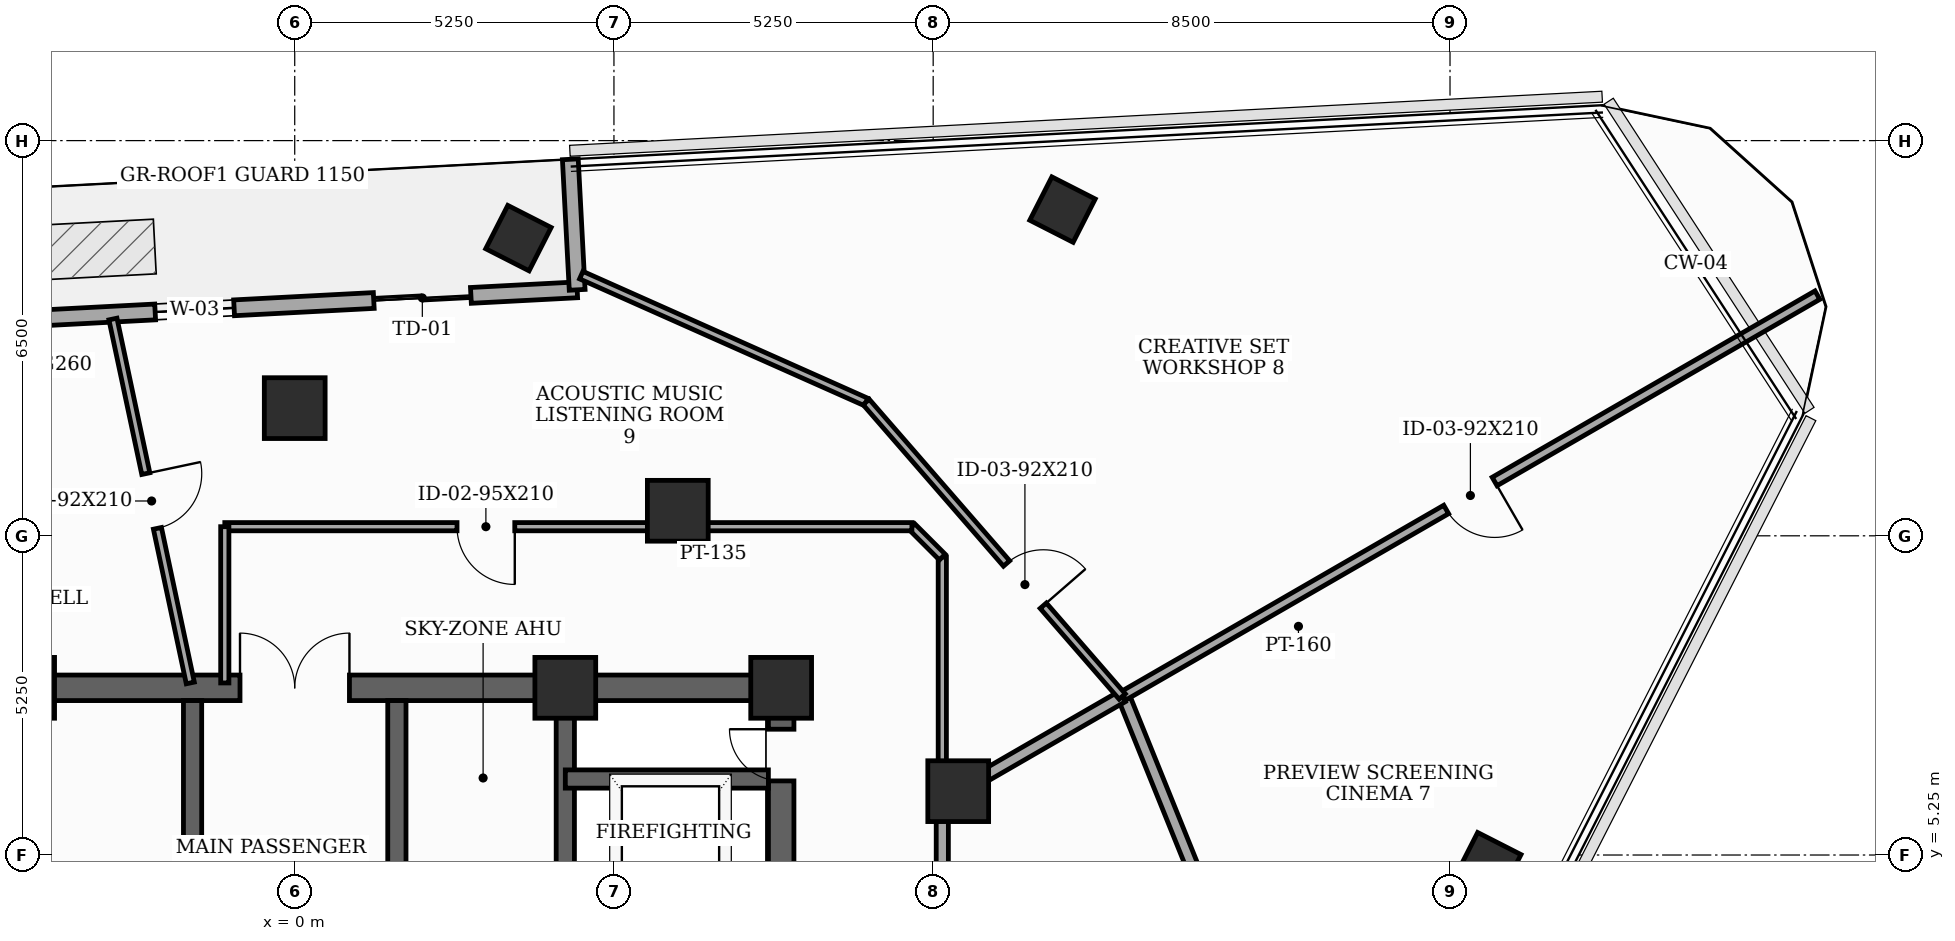
"""IFC4 building model, lengths in metres.
Left out: names, types, materials, properties, quantities, classifications, styles, units other than length and angle.
Written with IfcOpenShell. Run it as: python <this file> out.ifc"""

import sys

from ifc_helpers import new_model, si_unit, direction, frame, frame_2d, origin, origin_2d, place, context, subcontext, project, spatial, rectangle, extrude, element, fill, save


model = new_model("IFC4")
c1 = context("Model", 3, precision=1e-05, world=origin(), true_north=direction((0.0, 1.0)))
c2 = subcontext(c1, "Body", "Model", "MODEL_VIEW")
j1 = project(units=[si_unit("LENGTHUNIT", "METRE"), si_unit("PLANEANGLEUNIT", "RADIAN")], contexts=[c1])
p1 = place(None, origin())
s1 = spatial("IfcSite", under=j1, at=p1, CompositionType="ELEMENT")
p2 = place(p1, origin())
s2 = spatial("IfcBuilding", under=s1, at=p2, CompositionType="ELEMENT")
p3 = place(p2, frame((0.0, 0.0, 270.7)))
s3 = spatial("IfcBuildingStorey", under=s2, at=p3, CompositionType="ELEMENT", Elevation=270.7)
for number, where, z_axis, x_axis in (
    (1, (8.0, 8.0, 0.0), (0.0, 0.0, 1.0), (1.0, 0.0, 0.0)),
    (2, (4.45, 8.0, 0.0), (0.0, 0.0, 1.0), (1.0, 0.0, 0.0)),
    (3, (-4.45, 8.0, 0.0), (0.0, 0.0, 1.0), (1.0, 0.0, 0.0)),
    (4, (10.912, 6.3, 0.0), (0.0, 0.0, 1.0), (1.0, 0.0, 0.0)),
    (5, (6.3, 10.912, 0.0), (0.0, 0.0, 1.0), (1.0, 0.0, 0.0)),
    (6, (0.0, 12.6, 0.0), (0.0, 0.0, 1.0), (1.0, 0.0, 0.0)),
):
    element("IfcColumn", number, at=place(p3, frame(where, z_axis=z_axis, x_axis=x_axis)), inside=s3, PredefinedType="COLUMN", context=c2, shape_type="SweptSolid", body=[
        extrude(rectangle(XDim=1.0, YDim=1.0, at=origin_2d()), origin(), (0.0, 0.0, 1.0), 3.7),
    ])
for number, where, z_axis, x_axis in (
    (7, (19.629, 5.082, 0.0), (0.0, 0.0, 1.0), (0.454, 0.891, 0.0)),
    (8, (12.627, 15.865, 0.0), (0.0, 0.0, 1.0), (0.454, 0.891, 0.0)),
    (9, (3.679, 15.396, 0.0), (0.0, 0.0, 1.0), (0.454, 0.891, 0.0)),
):
    element("IfcColumn", number, at=place(p3, frame(where, z_axis=z_axis, x_axis=x_axis)), inside=s3, PredefinedType="COLUMN", context=c2, shape_type="SweptSolid", body=[
        extrude(rectangle(XDim=0.8, YDim=0.8, at=origin_2d()), origin(), (0.0, 0.0, 1.0), 3.7),
    ])
p4 = place(p3, frame((4.645, 14.546, 0.0), z_axis=(0.0, 0.0, 1.0), x_axis=(-0.99862973094, -0.052332212675, 0.0)))
e10 = element("IfcWall", 10, at=p4, inside=s3, PredefinedType="SOLIDWALL", context=c2, shape_type="SweptSolid", body=[
    extrude(rectangle(XDim=10.8, YDim=0.26, at=frame_2d((5.4, 0.0))), origin(), (0.0, 0.0, 1.0), 3.5),
])
p5 = place(p4, frame((1.75, 0.0, 0.0)))
e11 = element("IfcOpeningElement", 11, at=p5, cuts=e10, PredefinedType="OPENING", context=c2, shape_type="SweptSolid", body=[
    extrude(rectangle(XDim=1.6, YDim=2.08, at=frame_2d((0.8, 1.04))), frame((0.0, 0.14, 0.0), z_axis=(0.0, -1.0, 0.0), x_axis=(1.0, 0.0, 0.0)), (0.0, 0.0, 1.0), 0.28),
])
p6 = place(p4, frame((5.65, 0.0, 0.85)))
e12 = element("IfcOpeningElement", 12, at=p6, cuts=e10, PredefinedType="OPENING", context=c2, shape_type="SweptSolid", body=[
    extrude(rectangle(XDim=1.3, YDim=1.25, at=frame_2d((0.65, 0.625))), frame((0.0, 0.14, 0.0), z_axis=(0.0, -1.0, 0.0), x_axis=(1.0, 0.0, 0.0)), (0.0, 0.0, 1.0), 0.28),
])
p7 = place(p3, frame((4.532, 16.693, 0.0), z_axis=(0.0, 0.0, 1.0), x_axis=(0.052350224103, -0.998628786905, 0.0)))
e13 = element("IfcWall", 13, at=p7, inside=s3, PredefinedType="SOLIDWALL", context=c2, shape_type="SweptSolid", body=[
    extrude(rectangle(XDim=2.15, YDim=0.26, at=frame_2d((1.075, 0.0))), origin(), (0.0, 0.0, 1.0), 3.5),
])
p8 = place(p3, frame((8.0, -8.0, 0.0), z_axis=(0.0, 0.0, 1.0), x_axis=(0.0, 1.0, 0.0)))
e14 = element("IfcWall", 14, at=p8, inside=s3, PredefinedType="SHEAR", context=c2, shape_type="SweptSolid", body=[
    extrude(rectangle(XDim=16.0, YDim=0.42, at=frame_2d((8.0, 0.0))), origin(), (0.0, 0.0, 1.0), 3.5),
])
p9 = place(p8, frame((9.6, 0.0, 0.0)))
e15 = element("IfcOpeningElement", 15, at=p9, cuts=e14, PredefinedType="OPENING", context=c2, shape_type="SweptSolid", body=[
    extrude(rectangle(XDim=1.05, YDim=2.15, at=frame_2d((0.525, 1.075))), frame((0.0, 0.22, 0.0), z_axis=(0.0, -1.0, 0.0), x_axis=(1.0, 0.0, 0.0)), (0.0, 0.0, 1.0), 0.44),
])
p10 = place(p8, frame((14.469, 0.0, 0.0)))
e16 = element("IfcOpeningElement", 16, at=p10, cuts=e14, PredefinedType="OPENING", context=c2, shape_type="SweptSolid", body=[
    extrude(rectangle(XDim=0.85, YDim=2.02, at=frame_2d((0.425, 1.01))), frame((0.0, 0.22, 0.0), z_axis=(0.0, -1.0, 0.0), x_axis=(1.0, 0.0, 0.0)), (0.0, 0.0, 1.0), 0.44),
])
p11 = place(p3, frame((-8.0, 8.0, 0.0), z_axis=(0.0, 0.0, 1.0), x_axis=(1.0, 0.0, 0.0)))
e17 = element("IfcWall", 17, at=p11, inside=s3, PredefinedType="SHEAR", context=c2, shape_type="SweptSolid", body=[
    extrude(rectangle(XDim=16.0, YDim=0.42, at=frame_2d((8.0, 0.0))), origin(), (0.0, 0.0, 1.0), 3.5),
])
p12 = place(p11, frame((7.1, 0.0, 0.0)))
e18 = element("IfcOpeningElement", 18, at=p12, cuts=e17, PredefinedType="OPENING", context=c2, shape_type="SweptSolid", body=[
    extrude(rectangle(XDim=1.8, YDim=2.15, at=frame_2d((0.9, 1.075))), frame((0.0, 0.22, 0.0), z_axis=(0.0, -1.0, 0.0), x_axis=(1.0, 0.0, 0.0)), (0.0, 0.0, 1.0), 0.44),
])
p13 = place(p3, frame((4.45, -7.79, 0.0), z_axis=(0.0, 0.0, 1.0), x_axis=(0.0, 1.0, 0.0)))
e19 = element("IfcWall", 19, at=p13, inside=s3, PredefinedType="SHEAR", context=c2, shape_type="SweptSolid", body=[
    extrude(rectangle(XDim=15.58, YDim=0.3, at=frame_2d((7.79, 0.0))), origin(), (0.0, 0.0, 1.0), 3.5),
])
p14 = place(p3, frame((4.45, 6.5, 0.0), z_axis=(0.0, 0.0, 1.0), x_axis=(1.0, 0.0, 0.0)))
e20 = element("IfcWall", 20, at=p14, inside=s3, PredefinedType="SHEAR", context=c2, shape_type="SweptSolid", body=[
    extrude(rectangle(XDim=3.34, YDim=0.3, at=frame_2d((1.67, 0.0))), origin(), (0.0, 0.0, 1.0), 3.5),
])
p15 = place(p3, frame((-1.68, -4.85, 0.0), z_axis=(0.0, 0.0, 1.0), x_axis=(0.0, 1.0, 0.0)))
e21 = element("IfcWall", 21, at=p15, inside=s3, PredefinedType="SHEAR", context=c2, shape_type="SweptSolid", body=[
    extrude(rectangle(XDim=12.64, YDim=0.3, at=frame_2d((6.32, 0.0))), origin(), (0.0, 0.0, 1.0), 3.5),
])
p16 = place(p15, frame((1.05, 0.0, 0.0)))
e22 = element("IfcOpeningElement", 22, at=p16, cuts=e21, PredefinedType="OPENING", context=c2, shape_type="SweptSolid", body=[
    extrude(rectangle(XDim=0.85, YDim=2.02, at=frame_2d((0.425, 1.01))), frame((0.0, 0.16, 0.0), z_axis=(0.0, -1.0, 0.0), x_axis=(1.0, 0.0, 0.0)), (0.0, 0.0, 1.0), 0.32),
])
p17 = place(p15, frame((6.8, 0.0, 0.0)))
e23 = element("IfcOpeningElement", 23, at=p17, cuts=e21, PredefinedType="OPENING", context=c2, shape_type="SweptSolid", body=[
    extrude(rectangle(XDim=0.95, YDim=2.1, at=frame_2d((0.475, 1.05))), frame((0.0, 0.16, 0.0), z_axis=(0.0, -1.0, 0.0), x_axis=(1.0, 0.0, 0.0)), (0.0, 0.0, 1.0), 0.32),
])
p18 = place(p3, frame((1.68, -4.85, 0.0), z_axis=(0.0, 0.0, 1.0), x_axis=(0.0, 1.0, 0.0)))
e24 = element("IfcWall", 24, at=p18, inside=s3, PredefinedType="SHEAR", context=c2, shape_type="SweptSolid", body=[
    extrude(rectangle(XDim=12.64, YDim=0.3, at=frame_2d((6.32, 0.0))), origin(), (0.0, 0.0, 1.0), 3.5),
])
p19 = place(p18, frame((0.55, 0.0, 0.0)))
e25 = element("IfcOpeningElement", 25, at=p19, cuts=e24, PredefinedType="OPENING", context=c2, shape_type="SweptSolid", body=[
    extrude(rectangle(XDim=1.1, YDim=2.1, at=frame_2d((0.55, 1.05))), frame((0.0, 0.16, 0.0), z_axis=(0.0, -1.0, 0.0), x_axis=(1.0, 0.0, 0.0)), (0.0, 0.0, 1.0), 0.32),
])
p20 = place(p18, frame((2.65, 0.0, 0.0)))
e26 = element("IfcOpeningElement", 26, at=p20, cuts=e24, PredefinedType="OPENING", context=c2, shape_type="SweptSolid", body=[
    extrude(rectangle(XDim=1.1, YDim=2.1, at=frame_2d((0.55, 1.05))), frame((0.0, 0.16, 0.0), z_axis=(0.0, -1.0, 0.0), x_axis=(1.0, 0.0, 0.0)), (0.0, 0.0, 1.0), 0.32),
])
p21 = place(p18, frame((4.75, 0.0, 0.0)))
e27 = element("IfcOpeningElement", 27, at=p21, cuts=e24, PredefinedType="OPENING", context=c2, shape_type="SweptSolid", body=[
    extrude(rectangle(XDim=1.1, YDim=2.1, at=frame_2d((0.55, 1.05))), frame((0.0, 0.16, 0.0), z_axis=(0.0, -1.0, 0.0), x_axis=(1.0, 0.0, 0.0)), (0.0, 0.0, 1.0), 0.32),
])
p22 = place(p18, frame((8.9, 0.0, 0.0)))
e28 = element("IfcOpeningElement", 28, at=p22, cuts=e24, PredefinedType="OPENING", context=c2, shape_type="SweptSolid", body=[
    extrude(rectangle(XDim=0.95, YDim=2.1, at=frame_2d((0.475, 1.05))), frame((0.0, 0.16, 0.0), z_axis=(0.0, -1.0, 0.0), x_axis=(1.0, 0.0, 0.0)), (0.0, 0.0, 1.0), 0.32),
])
p23 = place(p3, frame((10.65, 2.45, 0.0), z_axis=(0.0, 0.0, 1.0), x_axis=(0.0, 1.0, 0.0)))
e29 = element("IfcWall", 29, at=p23, inside=s3, PredefinedType="SOLIDWALL", context=c2, shape_type="SweptSolid", body=[
    extrude(rectangle(XDim=3.699, YDim=0.2, at=frame_2d((1.85, 0.0))), origin(), (0.0, 0.0, 1.0), 3.5),
])
p24 = place(p23, frame((0.561, 0.0, 0.0)))
e30 = element("IfcOpeningElement", 30, at=p24, cuts=e29, PredefinedType="OPENING", context=c2, shape_type="SweptSolid", body=[
    extrude(rectangle(XDim=0.95, YDim=2.1, at=frame_2d((0.475, 1.05))), frame((0.0, 0.11, 0.0), z_axis=(0.0, -1.0, 0.0), x_axis=(1.0, 0.0, 0.0)), (0.0, 0.0, 1.0), 0.22),
])
p25 = place(p3, frame((10.65, 6.149, 0.0), z_axis=(0.0, 0.0, 1.0), x_axis=(0.0, 1.0, 0.0)))
e31 = element("IfcWall", 31, at=p25, inside=s3, PredefinedType="PARTITIONING", context=c2, shape_type="SweptSolid", body=[
    extrude(rectangle(XDim=4.001, YDim=0.135, at=frame_2d((2.0, 0.0))), origin(), (0.0, 0.0, 1.0), 2.885),
])
p26 = place(p3, frame((10.65, 10.15, 0.0), z_axis=(0.0, 0.0, 1.0), x_axis=(-0.707106781187, 0.707106781187, 0.0)))
e32 = element("IfcWall", 32, at=p26, inside=s3, PredefinedType="PARTITIONING", context=c2, shape_type="SweptSolid", body=[
    extrude(rectangle(XDim=0.707, YDim=0.135, at=frame_2d((0.354, 0.0))), origin(), (0.0, 0.0, 1.0), 3.5),
])
p27 = place(p3, frame((10.15, 10.65, 0.0), z_axis=(0.0, 0.0, 1.0), x_axis=(-1.0, 0.0, 0.0)))
e33 = element("IfcWall", 33, at=p27, inside=s3, PredefinedType="PARTITIONING", context=c2, shape_type="SweptSolid", body=[
    extrude(rectangle(XDim=11.3, YDim=0.135, at=frame_2d((5.65, 0.0))), origin(), (0.0, 0.0, 1.0), 2.885),
])
p28 = place(p27, frame((6.531, 0.0, 0.0)))
e34 = element("IfcOpeningElement", 34, at=p28, cuts=e33, PredefinedType="OPENING", context=c2, shape_type="SweptSolid", body=[
    extrude(rectangle(XDim=0.95, YDim=2.1, at=frame_2d((0.475, 1.05))), frame((0.0, 0.077, 0.0), z_axis=(0.0, -1.0, 0.0), x_axis=(1.0, 0.0, 0.0)), (0.0, 0.0, 1.0), 0.155),
])
p29 = place(p3, frame((-1.15, 10.65, 0.0), z_axis=(0.0, 0.0, 1.0), x_axis=(0.0, -1.0, 0.0)))
e35 = element("IfcWall", 35, at=p29, inside=s3, PredefinedType="PARTITIONING", context=c2, shape_type="SweptSolid", body=[
    extrude(rectangle(XDim=2.57, YDim=0.135, at=frame_2d((1.285, 0.0))), origin(), (0.0, 0.0, 1.0), 2.885),
])
p30 = place(p3, frame((15.425, 3.42, 0.0), z_axis=(0.0, 0.0, 1.0), x_axis=(-0.374591900922, 0.927189790584, 0.0)))
e36 = element("IfcWall", 36, at=p30, inside=s3, PredefinedType="SOLIDWALL", context=c2, shape_type="SweptSolid", body=[
    extrude(rectangle(XDim=4.73, YDim=0.2, at=frame_2d((2.365, 0.0))), origin(), (0.0, 0.0, 1.0), 3.185),
])
p31 = place(p3, frame((13.609, 7.857, 0.0), z_axis=(0.0, 0.0, 1.0), x_axis=(-0.866071357471, -0.499920397431, 0.0)))
e37 = element("IfcWall", 37, at=p31, inside=s3, PredefinedType="SOLIDWALL", context=c2, shape_type="SweptSolid", body=[
    extrude(rectangle(XDim=3.417, YDim=0.2, at=frame_2d((1.708, 0.0))), origin(), (0.0, 0.0, 1.0), 2.885),
])
p32 = place(p3, frame((25.042, 14.458, 0.0), z_axis=(0.0, 0.0, 1.0), x_axis=(-0.866012847166, -0.50002174807, 0.0)))
e38 = element("IfcWall", 38, at=p32, inside=s3, PredefinedType="PARTITIONING", context=c2, shape_type="SweptSolid", body=[
    extrude(rectangle(XDim=13.181, YDim=0.16, at=frame_2d((6.59, 0.0))), origin(), (0.0, 0.0, 1.0), 3.035),
])
p33 = place(p32, frame((6.13, 0.0, 0.0)))
e39 = element("IfcOpeningElement", 39, at=p33, cuts=e38, PredefinedType="OPENING", context=c2, shape_type="SweptSolid", body=[
    extrude(rectangle(XDim=0.92, YDim=2.1, at=frame_2d((0.46, 1.05))), frame((0.0, 0.09, 0.0), z_axis=(0.0, -1.0, 0.0), x_axis=(1.0, 0.0, 0.0)), (0.0, 0.0, 1.0), 0.18),
])
p34 = place(p3, frame((4.712, 14.788, 0.0), z_axis=(0.0, 0.0, 1.0), x_axis=(0.913507055513, -0.406822884716, 0.0)))
e40 = element("IfcWall", 40, at=p34, inside=s3, PredefinedType="PARTITIONING", context=c2, shape_type="SweptSolid", body=[
    extrude(rectangle(XDim=5.129, YDim=0.135, at=frame_2d((2.564, 0.0))), origin(), (0.0, 0.0, 1.0), 3.035),
])
p35 = place(p3, frame((9.398, 12.701, 0.0), z_axis=(0.0, 0.0, 1.0), x_axis=(0.656069468174, -0.754700505452, 0.0)))
e41 = element("IfcWall", 41, at=p35, inside=s3, PredefinedType="PARTITIONING", context=c2, shape_type="SweptSolid", body=[
    extrude(rectangle(XDim=6.418, YDim=0.135, at=frame_2d((3.209, 0.0))), origin(), (0.0, 0.0, 1.0), 3.185),
])
p36 = place(p35, frame((3.52, 0.0, 0.0)))
e42 = element("IfcOpeningElement", 42, at=p36, cuts=e41, PredefinedType="OPENING", context=c2, shape_type="SweptSolid", body=[
    extrude(rectangle(XDim=0.92, YDim=2.1, at=frame_2d((0.46, 1.05))), frame((0.0, 0.077, 0.0), z_axis=(0.0, -1.0, 0.0), x_axis=(1.0, 0.0, 0.0)), (0.0, 0.0, 1.0), 0.155),
])
p37 = place(p3, frame((-2.99, 14.065, 0.0), z_axis=(0.0, 0.0, 1.0), x_axis=(0.207910291146, -0.978147898242, 0.0)))
e43 = element("IfcWall", 43, at=p37, inside=s3, PredefinedType="PARTITIONING", context=c2, shape_type="SweptSolid", body=[
    extrude(rectangle(XDim=6.119, YDim=0.135, at=frame_2d((3.06, 0.0))), origin(), (0.0, 0.0, 1.0), 2.885),
])
p38 = place(p37, frame((2.6, 0.0, 0.0)))
e44 = element("IfcOpeningElement", 44, at=p38, cuts=e43, PredefinedType="OPENING", context=c2, shape_type="SweptSolid", body=[
    extrude(rectangle(XDim=0.92, YDim=2.1, at=frame_2d((0.46, 1.05))), frame((0.0, 0.077, 0.0), z_axis=(0.0, -1.0, 0.0), x_axis=(1.0, 0.0, 0.0)), (0.0, 0.0, 1.0), 0.155),
])
p39 = place(p5, frame((1.6, 0.0, 0.0), z_axis=(0.0, 0.0, 1.0), x_axis=(-1.0, 0.0, 0.0)))
e45 = element("IfcDoor", 45, at=p39, inside=s3, OperationType="DOUBLE_DOOR_SLIDING", PredefinedType="DOOR", context=c2, shape_type="SweptSolid", body=[
    extrude(rectangle(XDim=1.6, YDim=2.08, at=frame_2d((0.8, 1.04))), frame((0.0, 0.025, 0.0), z_axis=(0.0, -1.0, 0.0), x_axis=(1.0, 0.0, 0.0)), (0.0, 0.0, 1.0), 0.05),
])
fill(e11, e45)
p40 = place(p6, origin())
e46 = element("IfcWindow", 46, at=p40, inside=s3, PartitioningType="SINGLE_PANEL", PredefinedType="WINDOW", context=c2, shape_type="SweptSolid", body=[
    extrude(rectangle(XDim=1.3, YDim=1.25, at=frame_2d((0.65, 0.625))), frame((0.0, 0.03, 0.0), z_axis=(0.0, -1.0, 0.0), x_axis=(1.0, 0.0, 0.0)), (0.0, 0.0, 1.0), 0.06),
])
fill(e12, e46)
p41 = place(p10, origin())
e47 = element("IfcDoor", 47, at=p41, inside=s3, OperationType="SINGLE_SWING_RIGHT", PredefinedType="TRAPDOOR", context=c2, shape_type="SweptSolid", body=[
    extrude(rectangle(XDim=0.85, YDim=2.02, at=frame_2d((0.425, 1.01))), frame((0.0, 0.025, 0.0), z_axis=(0.0, -1.0, 0.0), x_axis=(1.0, 0.0, 0.0)), (0.0, 0.0, 1.0), 0.05),
])
fill(e16, e47)
p42 = place(p12, origin())
e48 = element("IfcDoor", 48, at=p42, inside=s3, OperationType="DOUBLE_DOOR_SINGLE_SWING", PredefinedType="DOOR", context=c2, shape_type="SweptSolid", body=[
    extrude(rectangle(XDim=1.8, YDim=2.15, at=frame_2d((0.9, 1.075))), frame((0.0, 0.025, 0.0), z_axis=(0.0, -1.0, 0.0), x_axis=(1.0, 0.0, 0.0)), (0.0, 0.0, 1.0), 0.05),
])
fill(e18, e48)
p43 = place(p28, origin())
e49 = element("IfcDoor", 49, at=p43, inside=s3, OperationType="SINGLE_SWING_LEFT", PredefinedType="DOOR", context=c2, shape_type="SweptSolid", body=[
    extrude(rectangle(XDim=0.95, YDim=2.1, at=frame_2d((0.475, 1.05))), frame((0.0, 0.025, 0.0), z_axis=(0.0, -1.0, 0.0), x_axis=(1.0, 0.0, 0.0)), (0.0, 0.0, 1.0), 0.05),
])
fill(e34, e49)
p44 = place(p33, origin())
e50 = element("IfcDoor", 50, at=p44, inside=s3, OperationType="SINGLE_SWING_LEFT", PredefinedType="DOOR", context=c2, shape_type="SweptSolid", body=[
    extrude(rectangle(XDim=0.92, YDim=2.1, at=frame_2d((0.46, 1.05))), frame((0.0, 0.025, 0.0), z_axis=(0.0, -1.0, 0.0), x_axis=(1.0, 0.0, 0.0)), (0.0, 0.0, 1.0), 0.05),
])
fill(e39, e50)
p45 = place(p36, origin())
e51 = element("IfcDoor", 51, at=p45, inside=s3, OperationType="SINGLE_SWING_RIGHT", PredefinedType="DOOR", context=c2, shape_type="SweptSolid", body=[
    extrude(rectangle(XDim=0.92, YDim=2.1, at=frame_2d((0.46, 1.05))), frame((0.0, 0.025, 0.0), z_axis=(0.0, -1.0, 0.0), x_axis=(1.0, 0.0, 0.0)), (0.0, 0.0, 1.0), 0.05),
])
fill(e42, e51)
p46 = place(p38, origin())
e52 = element("IfcDoor", 52, at=p46, inside=s3, OperationType="SINGLE_SWING_LEFT", PredefinedType="DOOR", context=c2, shape_type="SweptSolid", body=[
    extrude(rectangle(XDim=0.92, YDim=2.1, at=frame_2d((0.46, 1.05))), frame((0.0, 0.025, 0.0), z_axis=(0.0, -1.0, 0.0), x_axis=(1.0, 0.0, 0.0)), (0.0, 0.0, 1.0), 0.05),
])
fill(e44, e52)
save(model, sys.argv[1])
